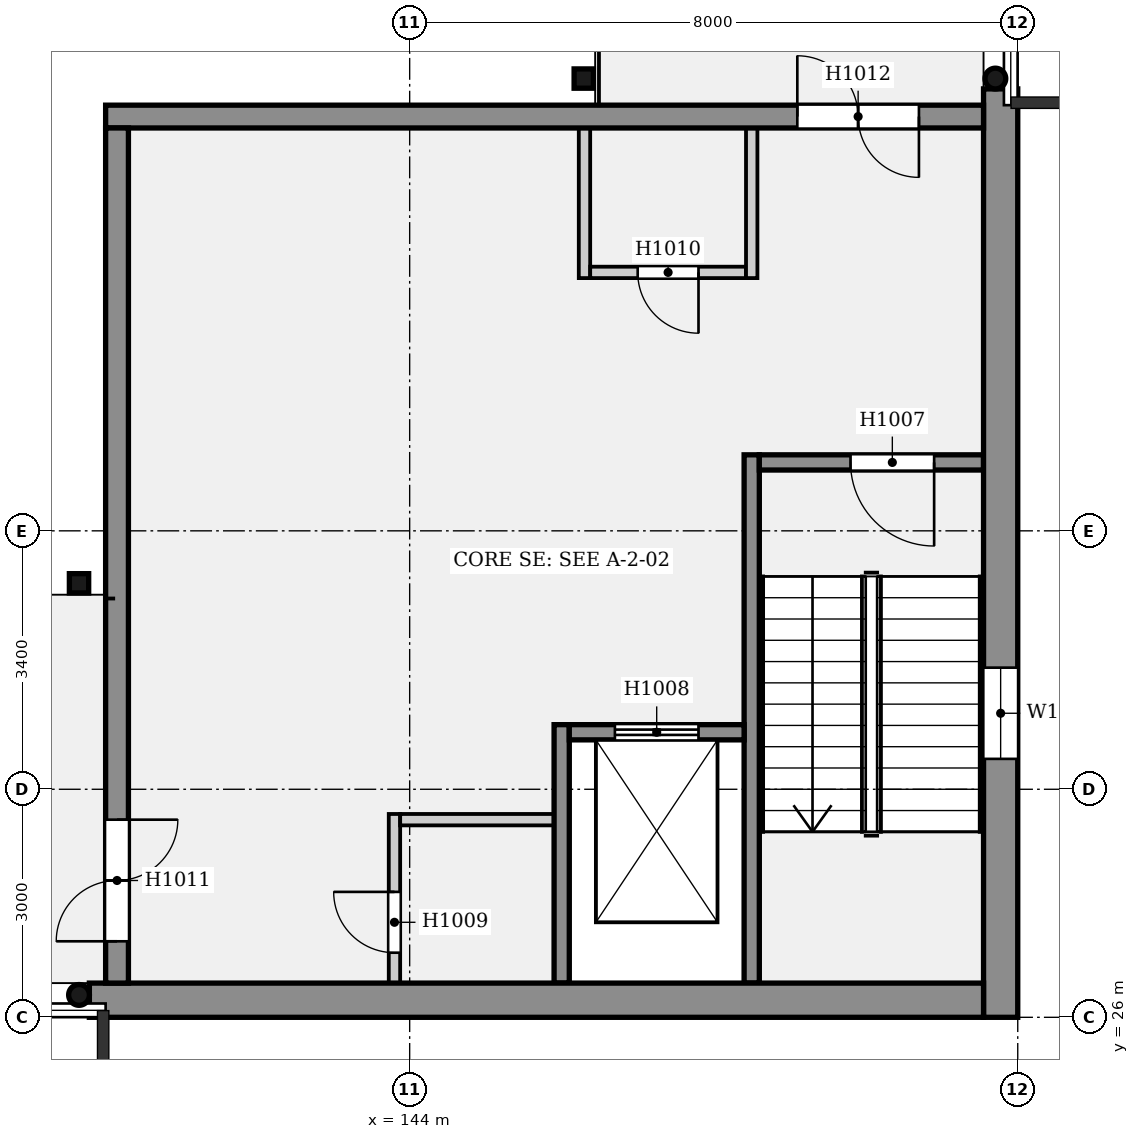
"""IFC4 building model, lengths in metres.
Left out: names, types, materials, properties, quantities, classifications, styles, units other than length and angle.
Written with IfcOpenShell. Run it as: python <this file> out.ifc"""

import sys

from ifc_helpers import new_model, si_unit, direction, frame, frame_2d, origin, origin_2d, place, context, subcontext, project, spatial, rectangle, hollow_rectangle, hollow_circle, extrude, element, fill, save


model = new_model("IFC4")
c1 = context("Model", 3, precision=1e-05, world=origin(), true_north=direction((0.0, 1.0)))
c2 = subcontext(c1, "Body", "Model", "MODEL_VIEW")
j1 = project(units=[si_unit("LENGTHUNIT", "METRE"), si_unit("PLANEANGLEUNIT", "RADIAN")], contexts=[c1])
p1 = place(None, origin())
s1 = spatial("IfcSite", under=j1, at=p1, CompositionType="ELEMENT")
p2 = place(p1, origin())
s2 = spatial("IfcBuilding", under=s1, at=p2, CompositionType="ELEMENT")
p3 = place(p2, frame((0.0, 0.0, 5.0)))
s3 = spatial("IfcBuildingStorey", under=s2, at=p3, CompositionType="ELEMENT", Elevation=5.0)
p4 = place(p3, frame((151.775, 26.0, 0.0), z_axis=(0.0, 0.0, 1.0), x_axis=(0.0, 1.0, 0.0)))
e1 = element("IfcWall", 1, at=p4, inside=s3, PredefinedType="ELEMENTEDWALL", context=c2, shape_type="SweptSolid", body=[
    extrude(rectangle(XDim=12.214, YDim=0.45, at=frame_2d((6.107, 0.0))), origin(), (0.0, 0.0, 1.0), 4.4),
])
p5 = place(p4, frame((3.4, 0.0, 0.6)))
e2 = element("IfcOpeningElement", 2, at=p5, cuts=e1, PredefinedType="OPENING", context=c2, shape_type="SweptSolid", body=[
    extrude(rectangle(XDim=1.2, YDim=3.0, at=frame_2d((0.6, 1.5))), frame((0.0, 0.235, 0.0), z_axis=(0.0, -1.0, 0.0), x_axis=(1.0, 0.0, 0.0)), (0.0, 0.0, 1.0), 0.47),
])
p6 = place(p3, frame((151.55, 26.225, 0.0), z_axis=(0.0, 0.0, 1.0), x_axis=(-1.0, 0.0, 0.0)))
e3 = element("IfcWall", 3, at=p6, inside=s3, PredefinedType="ELEMENTEDWALL", context=c2, shape_type="SweptSolid", body=[
    extrude(rectangle(XDim=11.764, YDim=0.45, at=frame_2d((5.882, 0.0))), origin(), (0.0, 0.0, 1.0), 4.4),
])
p7 = place(p3, frame((140.15, 26.45, 0.0), z_axis=(0.0, 0.0, 1.0), x_axis=(0.0, 1.0, 0.0)))
e4 = element("IfcWall", 4, at=p7, inside=s3, PredefinedType="SOLIDWALL", context=c2, shape_type="SweptSolid", body=[
    extrude(rectangle(XDim=11.25, YDim=0.3, at=frame_2d((5.625, 0.0))), origin(), (0.0, 0.0, 1.0), 4.4),
])
p8 = place(p7, frame((0.55, 0.0, 0.0)))
e5 = element("IfcOpeningElement", 5, at=p8, cuts=e4, PredefinedType="OPENING", context=c2, shape_type="SweptSolid", body=[
    extrude(rectangle(XDim=1.6, YDim=2.1, at=frame_2d((0.8, 1.05))), frame((0.0, 0.16, 0.0), z_axis=(0.0, -1.0, 0.0), x_axis=(1.0, 0.0, 0.0)), (0.0, 0.0, 1.0), 0.32),
])
p9 = place(p3, frame((151.55, 37.85, 0.0), z_axis=(0.0, 0.0, 1.0), x_axis=(-1.0, 0.0, 0.0)))
e6 = element("IfcWall", 6, at=p9, inside=s3, PredefinedType="SOLIDWALL", context=c2, shape_type="SweptSolid", body=[
    extrude(rectangle(XDim=11.55, YDim=0.3, at=frame_2d((5.775, 0.0))), origin(), (0.0, 0.0, 1.0), 4.4),
])
p10 = place(p9, frame((0.85, 0.0, 0.0)))
e7 = element("IfcOpeningElement", 7, at=p10, cuts=e6, PredefinedType="OPENING", context=c2, shape_type="SweptSolid", body=[
    extrude(rectangle(XDim=1.6, YDim=2.1, at=frame_2d((0.8, 1.05))), frame((0.0, 0.16, 0.0), z_axis=(0.0, -1.0, 0.0), x_axis=(1.0, 0.0, 0.0)), (0.0, 0.0, 1.0), 0.32),
])
p11 = place(p3, frame((139.65, 26.294, 0.027), z_axis=(0.0, -0.19937683017, 0.979922894717), x_axis=(1.0, 0.0, 0.0)))
e8 = element("IfcColumn", 8, at=p11, inside=s3, PredefinedType="COLUMN", context=c2, shape_type="SweptSolid", body=[
    extrude(hollow_circle(Radius=0.136, WallThickness=0.013, at=origin_2d()), origin(), (0.0, 0.0, 1.0), 4.462),
])
p12 = place(p3, frame((139.65, 31.71, 0.0), z_axis=(0.0, 0.0, 1.0), x_axis=(1.0, 0.0, 0.0)))
e9 = element("IfcColumn", 9, at=p12, inside=s3, PredefinedType="COLUMN", context=c2, shape_type="SweptSolid", body=[
    extrude(hollow_rectangle(XDim=0.254, YDim=0.254, WallThickness=0.016, InnerFilletRadius=0.008, OuterFilletRadius=0.024, at=origin_2d()), origin(), (0.0, 0.0, 1.0), 4.4),
])
p13 = place(p3, frame((151.706, 38.35, 0.027), z_axis=(0.19937683017, 0.0, 0.979922894717), x_axis=(0.0, 1.0, 0.0)))
e10 = element("IfcColumn", 10, at=p13, inside=s3, PredefinedType="COLUMN", context=c2, shape_type="SweptSolid", body=[
    extrude(hollow_circle(Radius=0.136, WallThickness=0.013, at=origin_2d()), origin(), (0.0, 0.0, 1.0), 4.462),
])
p14 = place(p3, frame((146.29, 38.35, 0.0), z_axis=(0.0, 0.0, 1.0), x_axis=(1.0, 0.0, 0.0)))
e11 = element("IfcColumn", 11, at=p14, inside=s3, PredefinedType="COLUMN", context=c2, shape_type="SweptSolid", body=[
    extrude(hollow_rectangle(XDim=0.254, YDim=0.254, WallThickness=0.016, InnerFilletRadius=0.008, OuterFilletRadius=0.024, at=origin_2d()), origin(), (0.0, 0.0, 1.0), 4.4),
])
p15 = place(p3, frame((148.5, 26.45, 0.0), z_axis=(0.0, 0.0, 1.0), x_axis=(0.0, 1.0, 0.0)))
e12 = element("IfcWall", 12, at=p15, inside=s3, PredefinedType="SOLIDWALL", context=c2, shape_type="SweptSolid", body=[
    extrude(rectangle(XDim=6.95, YDim=0.2, at=frame_2d((3.475, 0.0))), origin(), (0.0, 0.0, 1.0), 4.4),
])
p16 = place(p3, frame((151.55, 33.3, 0.0), z_axis=(0.0, 0.0, 1.0), x_axis=(-1.0, 0.0, 0.0)))
e13 = element("IfcWall", 13, at=p16, inside=s3, PredefinedType="SOLIDWALL", context=c2, shape_type="SweptSolid", body=[
    extrude(rectangle(XDim=2.95, YDim=0.2, at=frame_2d((1.475, 0.0))), origin(), (0.0, 0.0, 1.0), 4.4),
])
p17 = place(p16, frame((0.65, 0.0, 0.0)))
e14 = element("IfcOpeningElement", 14, at=p17, cuts=e13, PredefinedType="OPENING", context=c2, shape_type="SweptSolid", body=[
    extrude(rectangle(XDim=1.1, YDim=2.1, at=frame_2d((0.55, 1.05))), frame((0.0, 0.11, 0.0), z_axis=(0.0, -1.0, 0.0), x_axis=(1.0, 0.0, 0.0)), (0.0, 0.0, 1.0), 0.22),
])
p18 = place(p3, frame((146.0, 26.45, 0.0), z_axis=(0.0, 0.0, 1.0), x_axis=(0.0, 1.0, 0.0)))
e15 = element("IfcWall", 15, at=p18, inside=s3, PredefinedType="SOLIDWALL", context=c2, shape_type="SweptSolid", body=[
    extrude(rectangle(XDim=3.4, YDim=0.2, at=frame_2d((1.7, 0.0))), origin(), (0.0, 0.0, 1.0), 4.4),
])
p19 = place(p3, frame((148.4, 29.75, 0.0), z_axis=(0.0, 0.0, 1.0), x_axis=(-1.0, 0.0, 0.0)))
e16 = element("IfcWall", 16, at=p19, inside=s3, PredefinedType="SOLIDWALL", context=c2, shape_type="SweptSolid", body=[
    extrude(rectangle(XDim=2.3, YDim=0.2, at=frame_2d((1.15, 0.0))), origin(), (0.0, 0.0, 1.0), 4.4),
])
p20 = place(p19, frame((0.6, 0.0, 0.0)))
e17 = element("IfcOpeningElement", 17, at=p20, cuts=e16, PredefinedType="OPENING", context=c2, shape_type="SweptSolid", body=[
    extrude(rectangle(XDim=1.1, YDim=2.1, at=frame_2d((0.55, 1.05))), frame((0.0, 0.11, 0.0), z_axis=(0.0, -1.0, 0.0), x_axis=(1.0, 0.0, 0.0)), (0.0, 0.0, 1.0), 0.22),
])
p21 = place(p3, frame((145.9, 28.6, 0.0), z_axis=(0.0, 0.0, 1.0), x_axis=(-1.0, 0.0, 0.0)))
e18 = element("IfcWall", 18, at=p21, inside=s3, PredefinedType="PARTITIONING", context=c2, shape_type="SweptSolid", body=[
    extrude(rectangle(XDim=2.025, YDim=0.15, at=frame_2d((1.012, 0.0))), origin(), (0.0, 0.0, 1.0), 4.15),
])
p22 = place(p3, frame((143.8, 26.45, 0.0), z_axis=(0.0, 0.0, 1.0), x_axis=(0.0, 1.0, 0.0)))
e19 = element("IfcWall", 19, at=p22, inside=s3, PredefinedType="PARTITIONING", context=c2, shape_type="SweptSolid", body=[
    extrude(rectangle(XDim=2.225, YDim=0.15, at=frame_2d((1.113, 0.0))), origin(), (0.0, 0.0, 1.0), 4.15),
])
p23 = place(p22, frame((0.4, 0.0, 0.0)))
e20 = element("IfcOpeningElement", 20, at=p23, cuts=e19, PredefinedType="OPENING", context=c2, shape_type="SweptSolid", body=[
    extrude(rectangle(XDim=0.8, YDim=2.1, at=frame_2d((0.4, 1.05))), frame((0.0, 0.085, 0.0), z_axis=(0.0, -1.0, 0.0), x_axis=(1.0, 0.0, 0.0)), (0.0, 0.0, 1.0), 0.17),
])
p24 = place(p3, frame((148.425, 35.8, 0.0), z_axis=(0.0, 0.0, 1.0), x_axis=(-1.0, 0.0, 0.0)))
e21 = element("IfcWall", 21, at=p24, inside=s3, PredefinedType="PARTITIONING", context=c2, shape_type="SweptSolid", body=[
    extrude(rectangle(XDim=2.05, YDim=0.15, at=frame_2d((1.025, 0.0))), origin(), (0.0, 0.0, 1.0), 4.15),
])
p25 = place(p24, frame((0.625, 0.0, 0.0)))
e22 = element("IfcOpeningElement", 22, at=p25, cuts=e21, PredefinedType="OPENING", context=c2, shape_type="SweptSolid", body=[
    extrude(rectangle(XDim=0.8, YDim=2.1, at=frame_2d((0.4, 1.05))), frame((0.0, 0.085, 0.0), z_axis=(0.0, -1.0, 0.0), x_axis=(1.0, 0.0, 0.0)), (0.0, 0.0, 1.0), 0.17),
])
for number, where, z_axis, x_axis in (
    (23, (148.5, 35.725, 0.0), (0.0, 0.0, 1.0), (0.0, 1.0, 0.0)),
    (24, (146.3, 35.725, 0.0), (0.0, 0.0, 1.0), (0.0, 1.0, 0.0)),
):
    element("IfcWall", number, at=place(p3, frame(where, z_axis=z_axis, x_axis=x_axis)), inside=s3, PredefinedType="PARTITIONING", context=c2, shape_type="SweptSolid", body=[
        extrude(rectangle(XDim=1.975, YDim=0.15, at=frame_2d((0.987, 0.0))), origin(), (0.0, 0.0, 1.0), 4.15),
    ])
p26 = place(p17, origin())
e25 = element("IfcDoor", 25, at=p26, inside=s3, OperationType="SINGLE_SWING_LEFT", PredefinedType="DOOR", context=c2, shape_type="SweptSolid", body=[
    extrude(rectangle(XDim=1.1, YDim=2.1, at=frame_2d((0.55, 1.05))), frame((0.0, 0.025, 0.0), z_axis=(0.0, -1.0, 0.0), x_axis=(1.0, 0.0, 0.0)), (0.0, 0.0, 1.0), 0.05),
])
fill(e14, e25)
p27 = place(p20, origin())
e26 = element("IfcDoor", 26, at=p27, inside=s3, OperationType="DOUBLE_DOOR_SLIDING", PredefinedType="DOOR", context=c2, shape_type="SweptSolid", body=[
    extrude(rectangle(XDim=1.1, YDim=2.1, at=frame_2d((0.55, 1.05))), frame((0.0, 0.025, 0.0), z_axis=(0.0, -1.0, 0.0), x_axis=(1.0, 0.0, 0.0)), (0.0, 0.0, 1.0), 0.05),
])
fill(e17, e26)
p28 = place(p23, origin())
e27 = element("IfcDoor", 27, at=p28, inside=s3, OperationType="SINGLE_SWING_RIGHT", PredefinedType="DOOR", context=c2, shape_type="SweptSolid", body=[
    extrude(rectangle(XDim=0.8, YDim=2.1, at=frame_2d((0.4, 1.05))), frame((0.0, 0.025, 0.0), z_axis=(0.0, -1.0, 0.0), x_axis=(1.0, 0.0, 0.0)), (0.0, 0.0, 1.0), 0.05),
])
fill(e20, e27)
p29 = place(p25, origin())
e28 = element("IfcDoor", 28, at=p29, inside=s3, OperationType="SINGLE_SWING_LEFT", PredefinedType="DOOR", context=c2, shape_type="SweptSolid", body=[
    extrude(rectangle(XDim=0.8, YDim=2.1, at=frame_2d((0.4, 1.05))), frame((0.0, 0.025, 0.0), z_axis=(0.0, -1.0, 0.0), x_axis=(1.0, 0.0, 0.0)), (0.0, 0.0, 1.0), 0.05),
])
fill(e22, e28)
p30 = place(p8, origin())
e29 = element("IfcDoor", 29, at=p30, inside=s3, OperationType="DOUBLE_DOOR_SINGLE_SWING", PredefinedType="DOOR", context=c2, shape_type="SweptSolid", body=[
    extrude(rectangle(XDim=1.6, YDim=2.1, at=frame_2d((0.8, 1.05))), frame((0.0, 0.025, 0.0), z_axis=(0.0, -1.0, 0.0), x_axis=(1.0, 0.0, 0.0)), (0.0, 0.0, 1.0), 0.05),
])
fill(e5, e29)
p31 = place(p10, origin())
e30 = element("IfcDoor", 30, at=p31, inside=s3, OperationType="DOUBLE_DOOR_SINGLE_SWING", PredefinedType="DOOR", context=c2, shape_type="SweptSolid", body=[
    extrude(rectangle(XDim=1.6, YDim=2.1, at=frame_2d((0.8, 1.05))), frame((0.0, 0.025, 0.0), z_axis=(0.0, -1.0, 0.0), x_axis=(1.0, 0.0, 0.0)), (0.0, 0.0, 1.0), 0.05),
])
fill(e7, e30)
p32 = place(p5, origin())
e31 = element("IfcWindow", 31, at=p32, inside=s3, PartitioningType="SINGLE_PANEL", PredefinedType="WINDOW", context=c2, shape_type="SweptSolid", body=[
    extrude(rectangle(XDim=1.2, YDim=3.0, at=frame_2d((0.6, 1.5))), frame((0.0, 0.03, 0.0), z_axis=(0.0, -1.0, 0.0), x_axis=(1.0, 0.0, 0.0)), (0.0, 0.0, 1.0), 0.06),
])
fill(e2, e31)
save(model, sys.argv[1])
